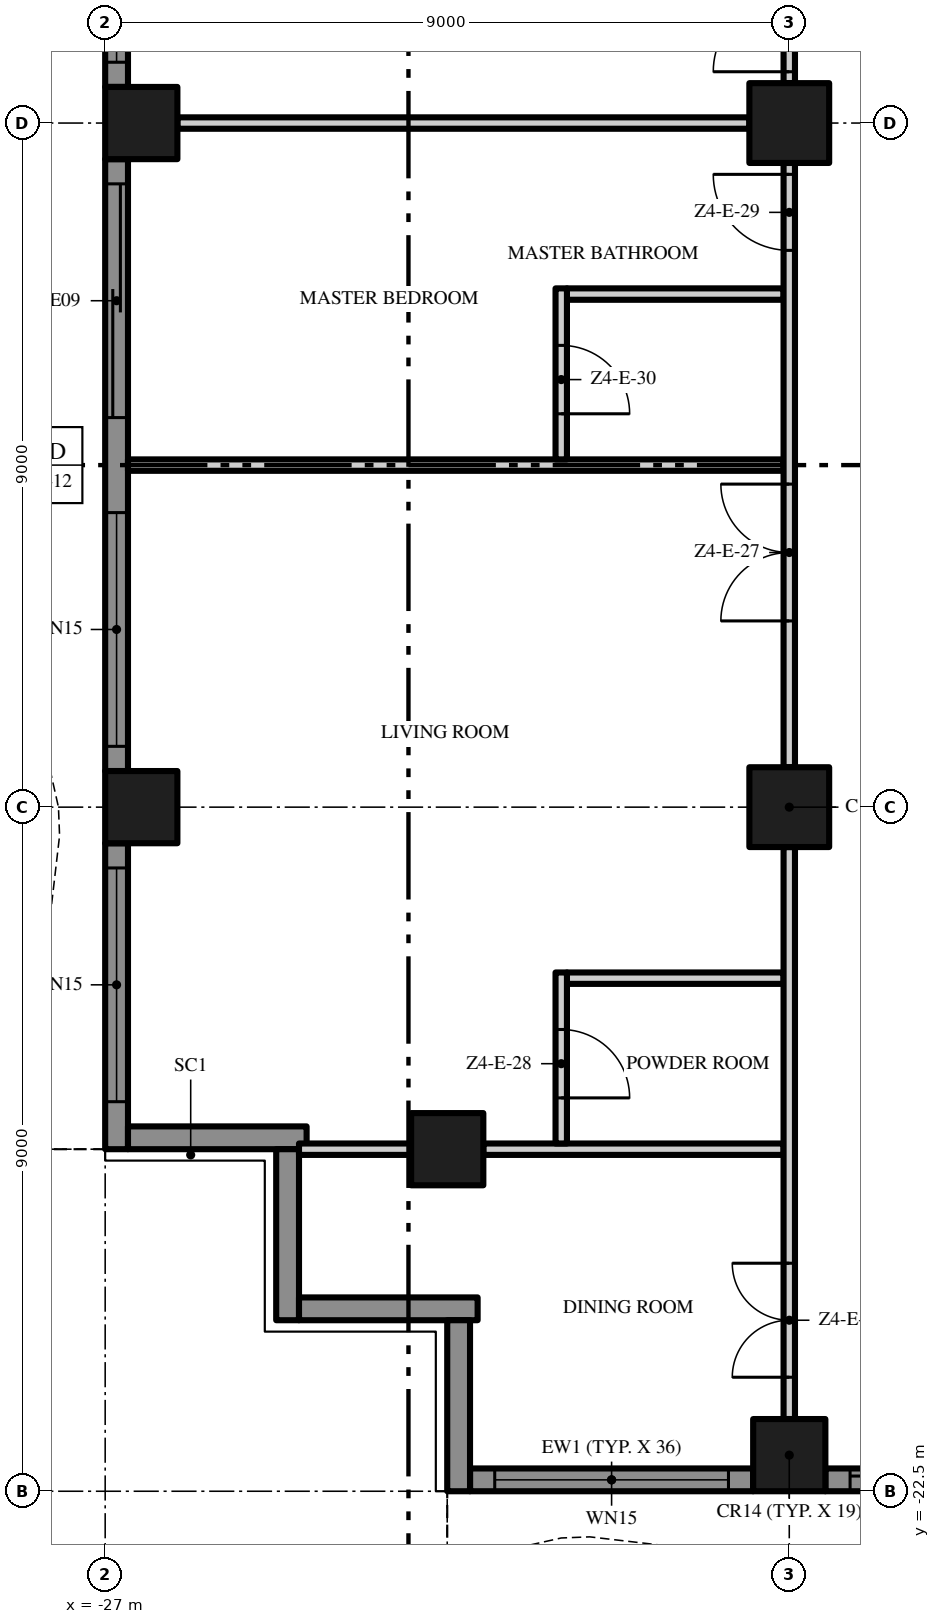
"""IFC4 building model, lengths in metres.
Left out: names, types, materials, properties, quantities, classifications, styles, units other than length and angle.
Written with IfcOpenShell. Run it as: python <this file> out.ifc"""

import sys

from ifc_helpers import new_model, si_unit, direction, frame, frame_2d, origin, origin_2d, place, context, subcontext, project, spatial, polyline, rectangle, outline, extrude, element, fill, save


model = new_model("IFC4")
c1 = context("Model", 3, precision=1e-05, world=origin(), true_north=direction((0.0, 1.0)))
c2 = subcontext(c1, "Body", "Model", "MODEL_VIEW")
j1 = project(units=[si_unit("LENGTHUNIT", "METRE"), si_unit("PLANEANGLEUNIT", "RADIAN")], contexts=[c1])
p1 = place(None, origin())
s1 = spatial("IfcSite", under=j1, at=p1, CompositionType="ELEMENT")
p2 = place(p1, origin())
s2 = spatial("IfcBuilding", under=s1, at=p2, CompositionType="ELEMENT")
p3 = place(p2, frame((0.0, 0.0, 230.0)))
s3 = spatial("IfcBuildingStorey", under=s2, at=p3, CompositionType="ELEMENT", Elevation=230.0)
p4 = place(p3, frame((-18.0, -13.5, 0.0), z_axis=(0.0, 0.0, 1.0), x_axis=(1.0, 0.0, 0.0)))
e1 = element("IfcColumn", 1, at=p4, inside=s3, PredefinedType="COLUMN", context=c2, shape_type="SweptSolid", body=[
    extrude(rectangle(XDim=1.05, YDim=1.05, at=origin_2d()), origin(), (0.0, 0.0, 1.0), 3.5),
])
p5 = place(p3, frame((-18.0, -22.025, 0.0), z_axis=(0.0, 0.0, 1.0), x_axis=(1.0, 0.0, 0.0)))
e2 = element("IfcColumn", 2, at=p5, inside=s3, PredefinedType="COLUMN", context=c2, shape_type="SweptSolid", body=[
    extrude(rectangle(XDim=0.95, YDim=0.95, at=origin_2d()), origin(), (0.0, 0.0, 1.0), 3.5),
])
p6 = place(p3, frame((-18.0, -4.5, 0.0), z_axis=(0.0, 0.0, 1.0), x_axis=(1.0, 0.0, 0.0)))
e3 = element("IfcColumn", 3, at=p6, inside=s3, PredefinedType="COLUMN", context=c2, shape_type="SweptSolid", body=[
    extrude(rectangle(XDim=1.05, YDim=1.05, at=origin_2d()), origin(), (0.0, 0.0, 1.0), 3.5),
])
for number, where, z_axis, x_axis in (
    (4, (-26.525, -13.5, 0.0), (0.0, 0.0, 1.0), (1.0, 0.0, 0.0)),
    (5, (-22.5, -18.0, 0.0), (0.0, 0.0, 1.0), (1.0, 0.0, 0.0)),
    (6, (-26.525, -4.5, 0.0), (0.0, 0.0, 1.0), (1.0, 0.0, 0.0)),
):
    element("IfcColumn", number, at=place(p3, frame(where, z_axis=z_axis, x_axis=x_axis)), inside=s3, PredefinedType="COLUMN", context=c2, shape_type="SweptSolid", body=[
        extrude(rectangle(XDim=0.95, YDim=0.95, at=origin_2d()), origin(), (0.0, 0.0, 1.0), 3.5),
    ])
p7 = place(p3, frame((-18.475, -22.35, 0.0), z_axis=(0.0, 0.0, 1.0), x_axis=(-1.0, 0.0, 0.0)))
e7 = element("IfcWall", 7, at=p7, inside=s3, PredefinedType="SOLIDWALL", context=c2, shape_type="SweptSolid", body=[
    extrude(rectangle(XDim=3.725, YDim=0.3, at=frame_2d((1.863, 0.0))), origin(), (0.0, 0.0, 1.0), 3.5),
])
p8 = place(p7, frame((0.325, 0.0, 0.45)))
e8 = element("IfcOpeningElement", 8, at=p8, cuts=e7, PredefinedType="OPENING", context=c2, shape_type="SweptSolid", body=[
    extrude(rectangle(XDim=3.075, YDim=2.65, at=frame_2d((1.538, 1.325))), frame((0.0, 0.16, 0.0), z_axis=(0.0, -1.0, 0.0), x_axis=(1.0, 0.0, 0.0)), (0.0, 0.0, 1.0), 0.32),
])
p9 = place(p3, frame((-9.475, -22.35, 0.0), z_axis=(0.0, 0.0, 1.0), x_axis=(-1.0, 0.0, 0.0)))
e9 = element("IfcWall", 9, at=p9, inside=s3, PredefinedType="SOLIDWALL", context=c2, shape_type="SweptSolid", body=[
    extrude(rectangle(XDim=8.05, YDim=0.3, at=frame_2d((4.025, 0.0))), origin(), (0.0, 0.0, 1.0), 3.5),
])
p10 = place(p9, frame((4.65, 0.0, 0.0)))
e10 = element("IfcOpeningElement", 10, at=p10, cuts=e9, PredefinedType="OPENING", context=c2, shape_type="SweptSolid", body=[
    extrude(rectangle(XDim=3.075, YDim=2.4, at=frame_2d((1.538, 1.2))), frame((0.0, 0.16, 0.0), z_axis=(0.0, -1.0, 0.0), x_axis=(1.0, 0.0, 0.0)), (0.0, 0.0, 1.0), 0.32),
])
p11 = place(p9, frame((0.325, 0.0, 0.0)))
e11 = element("IfcOpeningElement", 11, at=p11, cuts=e9, PredefinedType="OPENING", context=c2, shape_type="SweptSolid", body=[
    extrude(rectangle(XDim=3.075, YDim=2.4, at=frame_2d((1.538, 1.2))), frame((0.0, 0.16, 0.0), z_axis=(0.0, -1.0, 0.0), x_axis=(1.0, 0.0, 0.0)), (0.0, 0.0, 1.0), 0.32),
])
p12 = place(p3, frame((-26.85, -4.025, 0.0), z_axis=(0.0, 0.0, 1.0), x_axis=(0.0, 1.0, 0.0)))
e12 = element("IfcWall", 12, at=p12, inside=s3, PredefinedType="SOLIDWALL", context=c2, shape_type="SweptSolid", body=[
    extrude(rectangle(XDim=8.05, YDim=0.3, at=frame_2d((4.025, 0.0))), origin(), (0.0, 0.0, 1.0), 3.5),
])
p13 = place(p12, frame((4.65, 0.0, 0.45)))
e13 = element("IfcOpeningElement", 13, at=p13, cuts=e12, PredefinedType="OPENING", context=c2, shape_type="SweptSolid", body=[
    extrude(rectangle(XDim=3.075, YDim=2.65, at=frame_2d((1.538, 1.325))), frame((0.0, 0.16, 0.0), z_axis=(0.0, -1.0, 0.0), x_axis=(1.0, 0.0, 0.0)), (0.0, 0.0, 1.0), 0.32),
])
p14 = place(p12, frame((0.325, 0.0, 0.45)))
e14 = element("IfcOpeningElement", 14, at=p14, cuts=e12, PredefinedType="OPENING", context=c2, shape_type="SweptSolid", body=[
    extrude(rectangle(XDim=3.075, YDim=2.65, at=frame_2d((1.538, 1.325))), frame((0.0, 0.16, 0.0), z_axis=(0.0, -1.0, 0.0), x_axis=(1.0, 0.0, 0.0)), (0.0, 0.0, 1.0), 0.32),
])
p15 = place(p3, frame((-26.85, -13.025, 0.0), z_axis=(0.0, 0.0, 1.0), x_axis=(0.0, 1.0, 0.0)))
e15 = element("IfcWall", 15, at=p15, inside=s3, PredefinedType="SOLIDWALL", context=c2, shape_type="SweptSolid", body=[
    extrude(rectangle(XDim=8.05, YDim=0.3, at=frame_2d((4.025, 0.0))), origin(), (0.0, 0.0, 1.0), 3.5),
])
p16 = place(p15, frame((4.65, 0.0, 0.0)))
e16 = element("IfcOpeningElement", 16, at=p16, cuts=e15, PredefinedType="OPENING", context=c2, shape_type="SweptSolid", body=[
    extrude(rectangle(XDim=3.075, YDim=2.4, at=frame_2d((1.538, 1.2))), frame((0.0, 0.16, 0.0), z_axis=(0.0, -1.0, 0.0), x_axis=(1.0, 0.0, 0.0)), (0.0, 0.0, 1.0), 0.32),
])
p17 = place(p15, frame((0.325, 0.0, 0.45)))
e17 = element("IfcOpeningElement", 17, at=p17, cuts=e15, PredefinedType="OPENING", context=c2, shape_type="SweptSolid", body=[
    extrude(rectangle(XDim=3.075, YDim=2.65, at=frame_2d((1.538, 1.325))), frame((0.0, 0.16, 0.0), z_axis=(0.0, -1.0, 0.0), x_axis=(1.0, 0.0, 0.0)), (0.0, 0.0, 1.0), 0.32),
])
p18 = place(p3, frame((-26.85, -18.0, 0.0), z_axis=(0.0, 0.0, 1.0), x_axis=(0.0, 1.0, 0.0)))
e18 = element("IfcWall", 18, at=p18, inside=s3, PredefinedType="SOLIDWALL", context=c2, shape_type="SweptSolid", body=[
    extrude(rectangle(XDim=4.025, YDim=0.3, at=frame_2d((2.013, 0.0))), origin(), (0.0, 0.0, 1.0), 3.5),
])
p19 = place(p18, frame((0.625, 0.0, 0.45)))
e19 = element("IfcOpeningElement", 19, at=p19, cuts=e18, PredefinedType="OPENING", context=c2, shape_type="SweptSolid", body=[
    extrude(rectangle(XDim=3.075, YDim=2.65, at=frame_2d((1.538, 1.325))), frame((0.0, 0.16, 0.0), z_axis=(0.0, -1.0, 0.0), x_axis=(1.0, 0.0, 0.0)), (0.0, 0.0, 1.0), 0.32),
])
p20 = place(p3, frame((-24.35, -17.85, 0.0), z_axis=(0.0, 0.0, 1.0), x_axis=(-1.0, 0.0, 0.0)))
e20 = element("IfcWall", 20, at=p20, inside=s3, PredefinedType="SOLIDWALL", context=c2, shape_type="SweptSolid", body=[
    extrude(rectangle(XDim=2.35, YDim=0.3, at=frame_2d((1.175, 0.0))), origin(), (0.0, 0.0, 1.0), 3.5),
])
p21 = place(p3, frame((-24.6, -20.25, 0.0), z_axis=(0.0, 0.0, 1.0), x_axis=(0.0, 1.0, 0.0)))
e21 = element("IfcWall", 21, at=p21, inside=s3, PredefinedType="SOLIDWALL", context=c2, shape_type="SweptSolid", body=[
    extrude(rectangle(XDim=2.25, YDim=0.3, at=frame_2d((1.125, 0.0))), origin(), (0.0, 0.0, 1.0), 3.5),
])
p22 = place(p3, frame((-22.1, -20.1, 0.0), z_axis=(0.0, 0.0, 1.0), x_axis=(-1.0, 0.0, 0.0)))
e22 = element("IfcWall", 22, at=p22, inside=s3, PredefinedType="SOLIDWALL", context=c2, shape_type="SweptSolid", body=[
    extrude(rectangle(XDim=2.35, YDim=0.3, at=frame_2d((1.175, 0.0))), origin(), (0.0, 0.0, 1.0), 3.5),
])
p23 = place(p3, frame((-22.35, -22.5, 0.0), z_axis=(0.0, 0.0, 1.0), x_axis=(0.0, 1.0, 0.0)))
e23 = element("IfcWall", 23, at=p23, inside=s3, PredefinedType="SOLIDWALL", context=c2, shape_type="SweptSolid", body=[
    extrude(rectangle(XDim=2.25, YDim=0.3, at=frame_2d((1.125, 0.0))), origin(), (0.0, 0.0, 1.0), 3.5),
])
p24 = place(p3, origin())
e24 = element("IfcWall", 24, at=p24, inside=s3, PredefinedType="USERDEFINED", context=c2, shape_type="SweptSolid", body=[
    extrude(outline(polyline([(-22.5, -23.451), (-21.0, -23.115), (-20.625, -23.1), (-19.5, -23.231), (-18.0, -23.755), (-16.5, -24.488), (-15.0, -25.149), (-13.5, -25.485), (-13.125, -25.5), (-12.0, -25.369), (-10.5, -24.845), (-9.0, -24.112), (-7.5, -23.451), (-6.0, -23.115), (-5.625, -23.1), (-4.5, -23.231), (-3.0, -23.755), (-1.5, -24.488), (0.0, -25.149), (1.5, -25.485), (1.875, -25.5), (3.0, -25.369), (4.5, -24.845), (6.0, -24.112), (7.5, -23.451), (9.0, -23.115), (9.375, -23.1), (10.5, -23.231), (12.0, -23.755), (13.5, -24.488), (15.0, -25.149), (16.5, -25.485), (16.875, -25.5), (18.0, -25.369), (19.5, -24.845), (21.0, -24.112), (22.5, -23.451), (22.399, -23.223), (20.895, -23.885), (19.404, -24.614), (17.944, -25.124), (16.865, -25.249), (16.533, -25.236), (15.079, -24.91), (13.605, -24.261), (12.096, -23.524), (10.556, -22.986), (9.385, -22.849), (8.967, -22.866), (7.421, -23.213), (5.895, -23.885), (4.404, -24.614), (2.944, -25.124), (1.865, -25.249), (1.533, -25.236), (0.079, -24.91), (-1.395, -24.261), (-2.904, -23.524), (-4.444, -22.986), (-5.615, -22.849), (-6.033, -22.866), (-7.579, -23.213), (-9.105, -23.885), (-10.596, -24.614), (-12.056, -25.124), (-13.135, -25.249), (-13.467, -25.236), (-14.921, -24.91), (-16.395, -24.261), (-17.904, -23.524), (-19.444, -22.986), (-20.615, -22.849), (-21.033, -22.866), (-22.555, -23.208), (-22.5, -23.451)])), origin(), (0.0, 0.0, 1.0), 0.9),
])
p25 = place(p3, origin())
e25 = element("IfcWall", 25, at=p25, inside=s3, PredefinedType="USERDEFINED", context=c2, shape_type="SweptSolid", body=[
    extrude(outline(polyline([(-27.951, 18.0), (-27.615, 16.5), (-27.6, 16.125), (-27.731, 15.0), (-28.255, 13.5), (-28.988, 12.0), (-29.649, 10.5), (-29.985, 9.0), (-30.0, 8.625), (-29.869, 7.5), (-29.345, 6.0), (-28.612, 4.5), (-27.951, 3.0), (-27.615, 1.5), (-27.6, 1.125), (-27.731, 0.0), (-28.255, -1.5), (-28.988, -3.0), (-29.649, -4.5), (-29.985, -6.0), (-30.0, -6.375), (-29.869, -7.5), (-29.345, -9.0), (-28.612, -10.5), (-27.951, -12.0), (-27.615, -13.5), (-27.6, -13.875), (-27.731, -15.0), (-28.255, -16.5), (-28.988, -18.0), (-28.763, -18.11), (-28.024, -16.596), (-27.486, -15.056), (-27.349, -13.885), (-27.366, -13.467), (-27.713, -11.921), (-28.385, -10.395), (-29.114, -8.904), (-29.624, -7.444), (-29.749, -6.365), (-29.736, -6.033), (-29.41, -4.579), (-28.761, -3.105), (-28.024, -1.596), (-27.486, -0.056), (-27.349, 1.115), (-27.366, 1.533), (-27.713, 3.079), (-28.385, 4.605), (-29.114, 6.096), (-29.624, 7.556), (-29.749, 8.635), (-29.736, 8.967), (-29.41, 10.421), (-28.761, 11.895), (-28.024, 13.404), (-27.486, 14.944), (-27.349, 16.115), (-27.366, 16.533), (-27.708, 18.055), (-27.951, 18.0)])), origin(), (0.0, 0.0, 1.0), 0.9),
])
p26 = place(p3, frame((-24.45, -18.0, 0.0), z_axis=(0.0, 0.0, 1.0), x_axis=(1.0, 0.0, 0.0)))
e26 = element("IfcWall", 26, at=p26, inside=s3, PredefinedType="PARTITIONING", context=c2, shape_type="SweptSolid", body=[
    extrude(rectangle(XDim=1.475, YDim=0.15, at=frame_2d((0.738, 0.0))), origin(), (0.0, 0.0, 1.0), 3.5),
])
p27 = place(p3, frame((-22.025, -18.0, 0.0), z_axis=(0.0, 0.0, 1.0), x_axis=(1.0, 0.0, 0.0)))
e27 = element("IfcWall", 27, at=p27, inside=s3, PredefinedType="PARTITIONING", context=c2, shape_type="SweptSolid", body=[
    extrude(rectangle(XDim=3.95, YDim=0.15, at=frame_2d((1.975, 0.0))), origin(), (0.0, 0.0, 1.0), 3.5),
])
p28 = place(p3, frame((-20.925, -15.75, 0.0), z_axis=(0.0, 0.0, 1.0), x_axis=(1.0, 0.0, 0.0)))
e28 = element("IfcWall", 28, at=p28, inside=s3, PredefinedType="PARTITIONING", context=c2, shape_type="SweptSolid", body=[
    extrude(rectangle(XDim=2.85, YDim=0.15, at=frame_2d((1.425, 0.0))), origin(), (0.0, 0.0, 1.0), 3.5),
])
p29 = place(p3, frame((-26.7, -9.0, 0.0), z_axis=(0.0, 0.0, 1.0), x_axis=(1.0, 0.0, 0.0)))
e29 = element("IfcWall", 29, at=p29, inside=s3, PredefinedType="PARTITIONING", context=c2, shape_type="SweptSolid", body=[
    extrude(rectangle(XDim=8.625, YDim=0.15, at=frame_2d((4.312, 0.0))), origin(), (0.0, 0.0, 1.0), 3.5),
])
p30 = place(p3, frame((-20.925, -6.75, 0.0), z_axis=(0.0, 0.0, 1.0), x_axis=(1.0, 0.0, 0.0)))
e30 = element("IfcWall", 30, at=p30, inside=s3, PredefinedType="PARTITIONING", context=c2, shape_type="SweptSolid", body=[
    extrude(rectangle(XDim=2.85, YDim=0.15, at=frame_2d((1.425, 0.0))), origin(), (0.0, 0.0, 1.0), 3.5),
])
p31 = place(p3, frame((-26.05, -4.5, 0.0), z_axis=(0.0, 0.0, 1.0), x_axis=(1.0, 0.0, 0.0)))
e31 = element("IfcWall", 31, at=p31, inside=s3, PredefinedType="PARTITIONING", context=c2, shape_type="SweptSolid", body=[
    extrude(rectangle(XDim=7.525, YDim=0.15, at=frame_2d((3.763, 0.0))), origin(), (0.0, 0.0, 1.0), 3.5),
])
p32 = place(p3, frame((-21.0, -15.675, 0.0), z_axis=(0.0, 0.0, 1.0), x_axis=(0.0, -1.0, 0.0)))
e32 = element("IfcWall", 32, at=p32, inside=s3, PredefinedType="PARTITIONING", context=c2, shape_type="SweptSolid", body=[
    extrude(rectangle(XDim=2.25, YDim=0.15, at=frame_2d((1.125, 0.0))), origin(), (0.0, 0.0, 1.0), 3.5),
])
p33 = place(p32, frame((0.75, 0.0, 0.0)))
e33 = element("IfcOpeningElement", 33, at=p33, cuts=e32, PredefinedType="OPENING", context=c2, shape_type="SweptSolid", body=[
    extrude(rectangle(XDim=0.9, YDim=2.1, at=frame_2d((0.45, 1.05))), frame((0.0, 0.085, 0.0), z_axis=(0.0, -1.0, 0.0), x_axis=(1.0, 0.0, 0.0)), (0.0, 0.0, 1.0), 0.17),
])
p34 = place(p3, frame((-21.0, -6.675, 0.0), z_axis=(0.0, 0.0, 1.0), x_axis=(0.0, -1.0, 0.0)))
e34 = element("IfcWall", 34, at=p34, inside=s3, PredefinedType="PARTITIONING", context=c2, shape_type="SweptSolid", body=[
    extrude(rectangle(XDim=2.25, YDim=0.15, at=frame_2d((1.125, 0.0))), origin(), (0.0, 0.0, 1.0), 3.5),
])
p35 = place(p34, frame((0.75, 0.0, 0.0)))
e35 = element("IfcOpeningElement", 35, at=p35, cuts=e34, PredefinedType="OPENING", context=c2, shape_type="SweptSolid", body=[
    extrude(rectangle(XDim=0.9, YDim=2.1, at=frame_2d((0.45, 1.05))), frame((0.0, 0.085, 0.0), z_axis=(0.0, -1.0, 0.0), x_axis=(1.0, 0.0, 0.0)), (0.0, 0.0, 1.0), 0.17),
])
p36 = place(p3, frame((-18.0, -21.55, 0.0), z_axis=(0.0, 0.0, 1.0), x_axis=(0.0, 1.0, 0.0)))
e36 = element("IfcWall", 36, at=p36, inside=s3, PredefinedType="PARTITIONING", context=c2, shape_type="SweptSolid", body=[
    extrude(rectangle(XDim=7.525, YDim=0.15, at=frame_2d((3.763, 0.0))), origin(), (0.0, 0.0, 1.0), 3.5),
])
p37 = place(p36, frame((0.55, 0.0, 0.0)))
e37 = element("IfcOpeningElement", 37, at=p37, cuts=e36, PredefinedType="OPENING", context=c2, shape_type="SweptSolid", body=[
    extrude(rectangle(XDim=1.5, YDim=2.4, at=frame_2d((0.75, 1.2))), frame((0.0, 0.085, 0.0), z_axis=(0.0, -1.0, 0.0), x_axis=(1.0, 0.0, 0.0)), (0.0, 0.0, 1.0), 0.17),
])
p38 = place(p3, frame((-18.0, -12.975, 0.0), z_axis=(0.0, 0.0, 1.0), x_axis=(0.0, 1.0, 0.0)))
e38 = element("IfcWall", 38, at=p38, inside=s3, PredefinedType="PARTITIONING", context=c2, shape_type="SweptSolid", body=[
    extrude(rectangle(XDim=7.95, YDim=0.15, at=frame_2d((3.975, 0.0))), origin(), (0.0, 0.0, 1.0), 3.5),
])
p39 = place(p38, frame((1.925, 0.0, 0.0)))
e39 = element("IfcOpeningElement", 39, at=p39, cuts=e38, PredefinedType="OPENING", context=c2, shape_type="SweptSolid", body=[
    extrude(rectangle(XDim=1.8, YDim=2.4, at=frame_2d((0.9, 1.2))), frame((0.0, 0.085, 0.0), z_axis=(0.0, -1.0, 0.0), x_axis=(1.0, 0.0, 0.0)), (0.0, 0.0, 1.0), 0.17),
])
p40 = place(p38, frame((6.8, 0.0, 0.0)))
e40 = element("IfcOpeningElement", 40, at=p40, cuts=e38, PredefinedType="OPENING", context=c2, shape_type="SweptSolid", body=[
    extrude(rectangle(XDim=1.0, YDim=2.4, at=frame_2d((0.5, 1.2))), frame((0.0, 0.085, 0.0), z_axis=(0.0, -1.0, 0.0), x_axis=(1.0, 0.0, 0.0)), (0.0, 0.0, 1.0), 0.17),
])
p41 = place(p3, frame((-18.0, -3.975, 0.0), z_axis=(0.0, 0.0, 1.0), x_axis=(0.0, 1.0, 0.0)))
e41 = element("IfcWall", 41, at=p41, inside=s3, PredefinedType="PARTITIONING", context=c2, shape_type="SweptSolid", body=[
    extrude(rectangle(XDim=3.875, YDim=0.15, at=frame_2d((1.938, 0.0))), origin(), (0.0, 0.0, 1.0), 3.5),
])
p42 = place(p41, frame((0.15, 0.0, 0.0)))
e42 = element("IfcOpeningElement", 42, at=p42, cuts=e41, PredefinedType="OPENING", context=c2, shape_type="SweptSolid", body=[
    extrude(rectangle(XDim=1.0, YDim=2.4, at=frame_2d((0.5, 1.2))), frame((0.0, 0.085, 0.0), z_axis=(0.0, -1.0, 0.0), x_axis=(1.0, 0.0, 0.0)), (0.0, 0.0, 1.0), 0.17),
])
p43 = place(p8, origin())
e43 = element("IfcWindow", 43, at=p43, inside=s3, PartitioningType="SINGLE_PANEL", PredefinedType="WINDOW", context=c2, shape_type="SweptSolid", body=[
    extrude(rectangle(XDim=3.075, YDim=2.65, at=frame_2d((1.538, 1.325))), frame((0.0, 0.03, 0.0), z_axis=(0.0, -1.0, 0.0), x_axis=(1.0, 0.0, 0.0)), (0.0, 0.0, 1.0), 0.06),
])
fill(e8, e43)
p44 = place(p10, origin())
e44 = element("IfcDoor", 44, at=p44, inside=s3, OperationType="SINGLE_SWING_LEFT", PredefinedType="DOOR", context=c2, shape_type="SweptSolid", body=[
    extrude(rectangle(XDim=3.075, YDim=2.4, at=frame_2d((1.538, 1.2))), frame((0.0, 0.025, 0.0), z_axis=(0.0, -1.0, 0.0), x_axis=(1.0, 0.0, 0.0)), (0.0, 0.0, 1.0), 0.05),
])
fill(e10, e44)
p45 = place(p14, origin())
e45 = element("IfcWindow", 45, at=p45, inside=s3, PartitioningType="SINGLE_PANEL", PredefinedType="WINDOW", context=c2, shape_type="SweptSolid", body=[
    extrude(rectangle(XDim=3.075, YDim=2.65, at=frame_2d((1.538, 1.325))), frame((0.0, 0.03, 0.0), z_axis=(0.0, -1.0, 0.0), x_axis=(1.0, 0.0, 0.0)), (0.0, 0.0, 1.0), 0.06),
])
fill(e14, e45)
p46 = place(p16, origin())
e46 = element("IfcDoor", 46, at=p46, inside=s3, OperationType="SINGLE_SWING_LEFT", PredefinedType="DOOR", context=c2, shape_type="SweptSolid", body=[
    extrude(rectangle(XDim=3.075, YDim=2.4, at=frame_2d((1.538, 1.2))), frame((0.0, 0.025, 0.0), z_axis=(0.0, -1.0, 0.0), x_axis=(1.0, 0.0, 0.0)), (0.0, 0.0, 1.0), 0.05),
])
fill(e16, e46)
p47 = place(p17, origin())
e47 = element("IfcWindow", 47, at=p47, inside=s3, PartitioningType="SINGLE_PANEL", PredefinedType="WINDOW", context=c2, shape_type="SweptSolid", body=[
    extrude(rectangle(XDim=3.075, YDim=2.65, at=frame_2d((1.538, 1.325))), frame((0.0, 0.03, 0.0), z_axis=(0.0, -1.0, 0.0), x_axis=(1.0, 0.0, 0.0)), (0.0, 0.0, 1.0), 0.06),
])
fill(e17, e47)
p48 = place(p19, origin())
e48 = element("IfcWindow", 48, at=p48, inside=s3, PartitioningType="SINGLE_PANEL", PredefinedType="WINDOW", context=c2, shape_type="SweptSolid", body=[
    extrude(rectangle(XDim=3.075, YDim=2.65, at=frame_2d((1.538, 1.325))), frame((0.0, 0.03, 0.0), z_axis=(0.0, -1.0, 0.0), x_axis=(1.0, 0.0, 0.0)), (0.0, 0.0, 1.0), 0.06),
])
fill(e19, e48)
p49 = place(p37, origin())
e49 = element("IfcDoor", 49, at=p49, inside=s3, OperationType="DOUBLE_DOOR_SINGLE_SWING", PredefinedType="DOOR", context=c2, shape_type="SweptSolid", body=[
    extrude(rectangle(XDim=1.5, YDim=2.4, at=frame_2d((0.75, 1.2))), frame((0.0, 0.025, 0.0), z_axis=(0.0, -1.0, 0.0), x_axis=(1.0, 0.0, 0.0)), (0.0, 0.0, 1.0), 0.05),
])
fill(e37, e49)
p50 = place(p39, origin())
e50 = element("IfcDoor", 50, at=p50, inside=s3, OperationType="DOUBLE_DOOR_SINGLE_SWING", PredefinedType="DOOR", context=c2, shape_type="SweptSolid", body=[
    extrude(rectangle(XDim=1.8, YDim=2.4, at=frame_2d((0.9, 1.2))), frame((0.0, 0.025, 0.0), z_axis=(0.0, -1.0, 0.0), x_axis=(1.0, 0.0, 0.0)), (0.0, 0.0, 1.0), 0.05),
])
fill(e39, e50)
p51 = place(p33, origin())
e51 = element("IfcDoor", 51, at=p51, inside=s3, OperationType="SINGLE_SWING_RIGHT", PredefinedType="DOOR", context=c2, shape_type="SweptSolid", body=[
    extrude(rectangle(XDim=0.9, YDim=2.1, at=frame_2d((0.45, 1.05))), frame((0.0, 0.025, 0.0), z_axis=(0.0, -1.0, 0.0), x_axis=(1.0, 0.0, 0.0)), (0.0, 0.0, 1.0), 0.05),
])
fill(e33, e51)
p52 = place(p40, origin())
e52 = element("IfcDoor", 52, at=p52, inside=s3, OperationType="SINGLE_SWING_RIGHT", PredefinedType="DOOR", context=c2, shape_type="SweptSolid", body=[
    extrude(rectangle(XDim=1.0, YDim=2.4, at=frame_2d((0.5, 1.2))), frame((0.0, 0.025, 0.0), z_axis=(0.0, -1.0, 0.0), x_axis=(1.0, 0.0, 0.0)), (0.0, 0.0, 1.0), 0.05),
])
fill(e40, e52)
p53 = place(p35, origin())
e53 = element("IfcDoor", 53, at=p53, inside=s3, OperationType="SINGLE_SWING_RIGHT", PredefinedType="DOOR", context=c2, shape_type="SweptSolid", body=[
    extrude(rectangle(XDim=0.9, YDim=2.1, at=frame_2d((0.45, 1.05))), frame((0.0, 0.025, 0.0), z_axis=(0.0, -1.0, 0.0), x_axis=(1.0, 0.0, 0.0)), (0.0, 0.0, 1.0), 0.05),
])
fill(e35, e53)
p54 = place(p42, origin())
e54 = element("IfcDoor", 54, at=p54, inside=s3, OperationType="SINGLE_SWING_LEFT", PredefinedType="DOOR", context=c2, shape_type="SweptSolid", body=[
    extrude(rectangle(XDim=1.0, YDim=2.4, at=frame_2d((0.5, 1.2))), frame((0.0, 0.025, 0.0), z_axis=(0.0, -1.0, 0.0), x_axis=(1.0, 0.0, 0.0)), (0.0, 0.0, 1.0), 0.05),
])
fill(e42, e54)
save(model, sys.argv[1])
